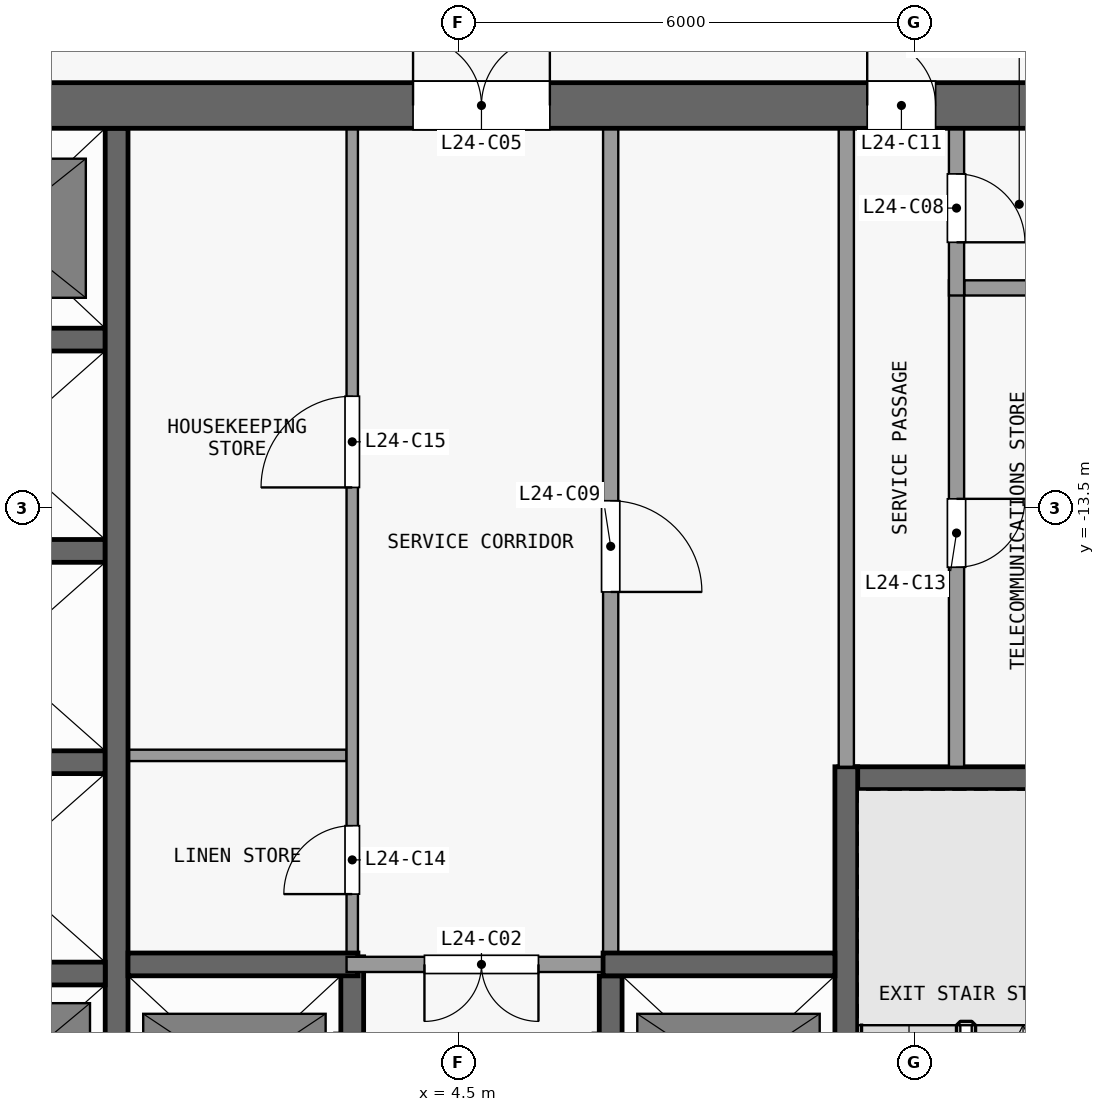
"""IFC4 building model, lengths in metres.
Left out: names, types, materials, properties, quantities, classifications, styles, units other than length and angle.
Written with IfcOpenShell. Run it as: python <this file> out.ifc"""

import sys

from ifc_helpers import new_model, si_unit, direction, frame, frame_2d, origin, place, context, subcontext, project, spatial, rectangle, extrude, element, fill, save


model = new_model("IFC4")
c1 = context("Model", 3, precision=1e-05, world=origin(), true_north=direction((0.0, 1.0)))
c2 = subcontext(c1, "Body", "Model", "MODEL_VIEW")
j1 = project(units=[si_unit("LENGTHUNIT", "METRE"), si_unit("PLANEANGLEUNIT", "RADIAN")], contexts=[c1])
p1 = place(None, origin())
s1 = spatial("IfcSite", under=j1, at=p1, CompositionType="ELEMENT")
p2 = place(p1, origin())
s2 = spatial("IfcBuilding", under=s1, at=p2, CompositionType="ELEMENT")
p3 = place(p2, frame((0.0, 0.0, 99.1)))
s3 = spatial("IfcBuildingStorey", under=s2, at=p3, CompositionType="ELEMENT", Elevation=99.1)
p4 = place(p3, frame((-13.4, -8.2, 0.0), z_axis=(0.0, 0.0, 1.0), x_axis=(1.0, 0.0, 0.0)))
e1 = element("IfcWall", 1, at=p4, inside=s3, PredefinedType="SHEAR", context=c2, shape_type="SweptSolid", body=[
    extrude(rectangle(XDim=26.8, YDim=0.6, at=frame_2d((13.4, 0.0))), origin(), (0.0, 0.0, 1.0), 3.3),
])
p5 = place(p4, frame((7.7, 0.0, 0.0)))
e2 = element("IfcOpeningElement", 2, at=p5, cuts=e1, PredefinedType="OPENING", context=c2, shape_type="SweptSolid", body=[
    extrude(rectangle(XDim=1.8, YDim=2.1, at=frame_2d((0.9, 1.05))), frame((0.0, 0.31, 0.0), z_axis=(0.0, -1.0, 0.0), x_axis=(1.0, 0.0, 0.0)), (0.0, 0.0, 1.0), 0.62),
])
p6 = place(p4, frame((17.3, 0.0, 0.0)))
e3 = element("IfcOpeningElement", 3, at=p6, cuts=e1, PredefinedType="OPENING", context=c2, shape_type="SweptSolid", body=[
    extrude(rectangle(XDim=1.8, YDim=2.1, at=frame_2d((0.9, 1.05))), frame((0.0, 0.31, 0.0), z_axis=(0.0, -1.0, 0.0), x_axis=(1.0, 0.0, 0.0)), (0.0, 0.0, 1.0), 0.62),
])
p7 = place(p4, frame((2.625, 0.0, 0.0)))
e4 = element("IfcOpeningElement", 4, at=p7, cuts=e1, PredefinedType="OPENING", context=c2, shape_type="SweptSolid", body=[
    extrude(rectangle(XDim=0.9, YDim=2.1, at=frame_2d((0.45, 1.05))), frame((0.0, 0.31, 0.0), z_axis=(0.0, -1.0, 0.0), x_axis=(1.0, 0.0, 0.0)), (0.0, 0.0, 1.0), 0.62),
])
p8 = place(p4, frame((23.275, 0.0, 0.0)))
e5 = element("IfcOpeningElement", 5, at=p8, cuts=e1, PredefinedType="OPENING", context=c2, shape_type="SweptSolid", body=[
    extrude(rectangle(XDim=0.9, YDim=2.1, at=frame_2d((0.45, 1.05))), frame((0.0, 0.31, 0.0), z_axis=(0.0, -1.0, 0.0), x_axis=(1.0, 0.0, 0.0)), (0.0, 0.0, 1.0), 0.62),
])
p9 = place(p3, frame((-2.95, -19.62, 0.0), z_axis=(0.0, 0.0, 1.0), x_axis=(1.0, 0.0, 0.0)))
e6 = element("IfcWall", 6, at=p9, inside=s3, PredefinedType="SHEAR", context=c2, shape_type="SweptSolid", body=[
    extrude(rectangle(XDim=2.8, YDim=0.3, at=frame_2d((1.4, 0.0))), origin(), (0.0, 0.0, 1.0), 3.3),
])
p10 = place(p3, frame((0.15, -19.5, 0.0), z_axis=(0.0, 0.0, 1.0), x_axis=(1.0, 0.0, 0.0)))
e7 = element("IfcWall", 7, at=p10, inside=s3, PredefinedType="SHEAR", context=c2, shape_type="SweptSolid", body=[
    extrude(rectangle(XDim=3.025, YDim=0.3, at=frame_2d((1.513, 0.0))), origin(), (0.0, 0.0, 1.0), 3.3),
])
p11 = place(p3, frame((6.4, -19.5, 0.0), z_axis=(0.0, 0.0, 1.0), x_axis=(-1.0, 0.0, 0.0)))
e8 = element("IfcWall", 8, at=p11, inside=s3, PredefinedType="PARTITIONING", context=c2, shape_type="SweptSolid", body=[
    extrude(rectangle(XDim=3.375, YDim=0.2, at=frame_2d((1.688, 0.0))), origin(), (0.0, 0.0, 1.0), 3.3),
])
p12 = place(p11, frame((0.85, 0.0, 0.0)))
e9 = element("IfcOpeningElement", 9, at=p12, cuts=e8, PredefinedType="OPENING", context=c2, shape_type="SweptSolid", body=[
    extrude(rectangle(XDim=1.5, YDim=2.1, at=frame_2d((0.75, 1.05))), frame((0.0, 0.11, 0.0), z_axis=(0.0, -1.0, 0.0), x_axis=(1.0, 0.0, 0.0)), (0.0, 0.0, 1.0), 0.22),
])
p13 = place(p3, frame((6.4, -19.5, 0.0), z_axis=(0.0, 0.0, 1.0), x_axis=(1.0, 0.0, 0.0)))
e10 = element("IfcWall", 10, at=p13, inside=s3, PredefinedType="SHEAR", context=c2, shape_type="SweptSolid", body=[
    extrude(rectangle(XDim=3.05, YDim=0.3, at=frame_2d((1.525, 0.0))), origin(), (0.0, 0.0, 1.0), 3.3),
])
p14 = place(p3, frame((9.5, -17.05, 0.0), z_axis=(0.0, 0.0, 1.0), x_axis=(1.0, 0.0, 0.0)))
e11 = element("IfcWall", 11, at=p14, inside=s3, PredefinedType="SHEAR", context=c2, shape_type="SweptSolid", body=[
    extrude(rectangle(XDim=3.1, YDim=0.3, at=frame_2d((1.55, 0.0))), origin(), (0.0, 0.0, 1.0), 3.3),
])
p15 = place(p3, frame((-2.95, -16.84, 0.0), z_axis=(0.0, 0.0, 1.0), x_axis=(1.0, 0.0, 0.0)))
e12 = element("IfcWall", 12, at=p15, inside=s3, PredefinedType="SHEAR", context=c2, shape_type="SweptSolid", body=[
    extrude(rectangle(XDim=2.8, YDim=0.3, at=frame_2d((1.4, 0.0))), origin(), (0.0, 0.0, 1.0), 3.3),
])
p16 = place(p3, frame((0.15, -16.75, 0.0), z_axis=(0.0, 0.0, 1.0), x_axis=(1.0, 0.0, 0.0)))
e13 = element("IfcWall", 13, at=p16, inside=s3, PredefinedType="PARTITIONING", context=c2, shape_type="SweptSolid", body=[
    extrude(rectangle(XDim=2.875, YDim=0.15, at=frame_2d((1.438, 0.0))), origin(), (0.0, 0.0, 1.0), 3.3),
])
for number, where, z_axis, x_axis in (
    (14, (-2.95, -14.06, 0.0), (0.0, 0.0, 1.0), (1.0, 0.0, 0.0)),
    (15, (-2.95, -11.28, 0.0), (0.0, 0.0, 1.0), (1.0, 0.0, 0.0)),
):
    element("IfcWall", number, at=place(p3, frame(where, z_axis=z_axis, x_axis=x_axis)), inside=s3, PredefinedType="SHEAR", context=c2, shape_type="SweptSolid", body=[
        extrude(rectangle(XDim=2.8, YDim=0.3, at=frame_2d((1.4, 0.0))), origin(), (0.0, 0.0, 1.0), 3.3),
    ])
p17 = place(p3, frame((11.15, -10.6, 0.0), z_axis=(0.0, 0.0, 1.0), x_axis=(1.0, 0.0, 0.0)))
e16 = element("IfcWall", 16, at=p17, inside=s3, PredefinedType="PARTITIONING", context=c2, shape_type="SweptSolid", body=[
    extrude(rectangle(XDim=1.45, YDim=0.2, at=frame_2d((0.725, 0.0))), origin(), (0.0, 0.0, 1.0), 3.3),
])
p18 = place(p3, frame((0.0, -22.25, 0.0), z_axis=(0.0, 0.0, 1.0), x_axis=(0.0, 1.0, 0.0)))
e17 = element("IfcWall", 17, at=p18, inside=s3, PredefinedType="SHEAR", context=c2, shape_type="SweptSolid", body=[
    extrude(rectangle(XDim=13.75, YDim=0.3, at=frame_2d((6.875, 0.0))), origin(), (0.0, 0.0, 1.0), 3.3),
])
p19 = place(p3, frame((3.1, -22.25, 0.0), z_axis=(0.0, 0.0, 1.0), x_axis=(0.0, 1.0, 0.0)))
e18 = element("IfcWall", 18, at=p19, inside=s3, PredefinedType="SHEAR", context=c2, shape_type="SweptSolid", body=[
    extrude(rectangle(XDim=2.85, YDim=0.3, at=frame_2d((1.425, 0.0))), origin(), (0.0, 0.0, 1.0), 3.3),
])
p20 = place(p19, frame((0.75, 0.0, 0.0)))
e19 = element("IfcOpeningElement", 19, at=p20, cuts=e18, PredefinedType="OPENING", context=c2, shape_type="SweptSolid", body=[
    extrude(rectangle(XDim=1.1, YDim=2.1, at=frame_2d((0.55, 1.05))), frame((0.0, 0.16, 0.0), z_axis=(0.0, -1.0, 0.0), x_axis=(1.0, 0.0, 0.0)), (0.0, 0.0, 1.0), 0.32),
])
p21 = place(p3, frame((3.1, -19.4, 0.0), z_axis=(0.0, 0.0, 1.0), x_axis=(0.0, 1.0, 0.0)))
e20 = element("IfcWall", 20, at=p21, inside=s3, PredefinedType="PARTITIONING", context=c2, shape_type="SweptSolid", body=[
    extrude(rectangle(XDim=10.9, YDim=0.15, at=frame_2d((5.45, 0.0))), origin(), (0.0, 0.0, 1.0), 3.3),
])
p22 = place(p21, frame((0.825, 0.0, 0.0)))
e21 = element("IfcOpeningElement", 21, at=p22, cuts=e20, PredefinedType="OPENING", context=c2, shape_type="SweptSolid", body=[
    extrude(rectangle(XDim=0.9, YDim=2.1, at=frame_2d((0.45, 1.05))), frame((0.0, 0.085, 0.0), z_axis=(0.0, -1.0, 0.0), x_axis=(1.0, 0.0, 0.0)), (0.0, 0.0, 1.0), 0.17),
])
p23 = place(p21, frame((6.175, 0.0, 0.0)))
e22 = element("IfcOpeningElement", 22, at=p23, cuts=e20, PredefinedType="OPENING", context=c2, shape_type="SweptSolid", body=[
    extrude(rectangle(XDim=1.2, YDim=2.1, at=frame_2d((0.6, 1.05))), frame((0.0, 0.085, 0.0), z_axis=(0.0, -1.0, 0.0), x_axis=(1.0, 0.0, 0.0)), (0.0, 0.0, 1.0), 0.17),
])
p24 = place(p3, frame((6.5, -22.25, 0.0), z_axis=(0.0, 0.0, 1.0), x_axis=(0.0, 1.0, 0.0)))
e23 = element("IfcWall", 23, at=p24, inside=s3, PredefinedType="SHEAR", context=c2, shape_type="SweptSolid", body=[
    extrude(rectangle(XDim=2.6, YDim=0.3, at=frame_2d((1.3, 0.0))), origin(), (0.0, 0.0, 1.0), 3.3),
])
p25 = place(p24, frame((0.75, 0.0, 0.0)))
e24 = element("IfcOpeningElement", 24, at=p25, cuts=e23, PredefinedType="OPENING", context=c2, shape_type="SweptSolid", body=[
    extrude(rectangle(XDim=1.1, YDim=2.1, at=frame_2d((0.55, 1.05))), frame((0.0, 0.16, 0.0), z_axis=(0.0, -1.0, 0.0), x_axis=(1.0, 0.0, 0.0)), (0.0, 0.0, 1.0), 0.32),
])
p26 = place(p3, frame((6.5, -8.5, 0.0), z_axis=(0.0, 0.0, 1.0), x_axis=(0.0, -1.0, 0.0)))
e25 = element("IfcWall", 25, at=p26, inside=s3, PredefinedType="PARTITIONING", context=c2, shape_type="SweptSolid", body=[
    extrude(rectangle(XDim=10.85, YDim=0.2, at=frame_2d((5.425, 0.0))), origin(), (0.0, 0.0, 1.0), 3.3),
])
p27 = place(p26, frame((4.9, 0.0, 0.0)))
e26 = element("IfcOpeningElement", 26, at=p27, cuts=e25, PredefinedType="OPENING", context=c2, shape_type="SweptSolid", body=[
    extrude(rectangle(XDim=1.2, YDim=2.1, at=frame_2d((0.6, 1.05))), frame((0.0, 0.11, 0.0), z_axis=(0.0, -1.0, 0.0), x_axis=(1.0, 0.0, 0.0)), (0.0, 0.0, 1.0), 0.22),
])
p28 = place(p3, frame((9.6, -16.9, 0.0), z_axis=(0.0, 0.0, 1.0), x_axis=(0.0, -1.0, 0.0)))
e27 = element("IfcWall", 27, at=p28, inside=s3, PredefinedType="SHEAR", context=c2, shape_type="SweptSolid", body=[
    extrude(rectangle(XDim=7.7, YDim=0.3, at=frame_2d((3.85, 0.0))), origin(), (0.0, 0.0, 1.0), 3.3),
])
p29 = place(p28, frame((6.5, 0.0, 0.0)))
e28 = element("IfcOpeningElement", 28, at=p29, cuts=e27, PredefinedType="OPENING", context=c2, shape_type="SweptSolid", body=[
    extrude(rectangle(XDim=1.1, YDim=2.1, at=frame_2d((0.55, 1.05))), frame((0.0, 0.16, 0.0), z_axis=(0.0, -1.0, 0.0), x_axis=(1.0, 0.0, 0.0)), (0.0, 0.0, 1.0), 0.32),
])
p30 = place(p3, frame((9.6, -16.9, 0.0), z_axis=(0.0, 0.0, 1.0), x_axis=(0.0, 1.0, 0.0)))
e29 = element("IfcWall", 29, at=p30, inside=s3, PredefinedType="PARTITIONING", context=c2, shape_type="SweptSolid", body=[
    extrude(rectangle(XDim=8.4, YDim=0.2, at=frame_2d((4.2, 0.0))), origin(), (0.0, 0.0, 1.0), 3.3),
])
p31 = place(p3, frame((11.05, -10.5, 0.0), z_axis=(0.0, 0.0, 1.0), x_axis=(0.0, -1.0, 0.0)))
e30 = element("IfcWall", 30, at=p31, inside=s3, PredefinedType="PARTITIONING", context=c2, shape_type="SweptSolid", body=[
    extrude(rectangle(XDim=6.4, YDim=0.2, at=frame_2d((3.2, 0.0))), origin(), (0.0, 0.0, 1.0), 3.3),
])
p32 = place(p31, frame((2.875, 0.0, 0.0)))
e31 = element("IfcOpeningElement", 31, at=p32, cuts=e30, PredefinedType="OPENING", context=c2, shape_type="SweptSolid", body=[
    extrude(rectangle(XDim=0.9, YDim=2.1, at=frame_2d((0.45, 1.05))), frame((0.0, 0.11, 0.0), z_axis=(0.0, -1.0, 0.0), x_axis=(1.0, 0.0, 0.0)), (0.0, 0.0, 1.0), 0.22),
])
p33 = place(p3, frame((11.05, -8.5, 0.0), z_axis=(0.0, 0.0, 1.0), x_axis=(0.0, -1.0, 0.0)))
e32 = element("IfcWall", 32, at=p33, inside=s3, PredefinedType="PARTITIONING", context=c2, shape_type="SweptSolid", body=[
    extrude(rectangle(XDim=2.2, YDim=0.2, at=frame_2d((1.1, 0.0))), origin(), (0.0, 0.0, 1.0), 3.3),
])
p34 = place(p33, frame((0.6, 0.0, 0.0)))
e33 = element("IfcOpeningElement", 33, at=p34, cuts=e32, PredefinedType="OPENING", context=c2, shape_type="SweptSolid", body=[
    extrude(rectangle(XDim=0.9, YDim=2.1, at=frame_2d((0.45, 1.05))), frame((0.0, 0.11, 0.0), z_axis=(0.0, -1.0, 0.0), x_axis=(1.0, 0.0, 0.0)), (0.0, 0.0, 1.0), 0.22),
])
p35 = place(p12, origin())
e34 = element("IfcDoor", 34, at=p35, inside=s3, OperationType="DOUBLE_DOOR_SINGLE_SWING", PredefinedType="DOOR", context=c2, shape_type="SweptSolid", body=[
    extrude(rectangle(XDim=1.5, YDim=2.1, at=frame_2d((0.75, 1.05))), frame((0.0, 0.025, 0.0), z_axis=(0.0, -1.0, 0.0), x_axis=(1.0, 0.0, 0.0)), (0.0, 0.0, 1.0), 0.05),
])
fill(e9, e34)
p36 = place(p6, origin())
e35 = element("IfcDoor", 35, at=p36, inside=s3, OperationType="DOUBLE_DOOR_SINGLE_SWING", PredefinedType="DOOR", context=c2, shape_type="SweptSolid", body=[
    extrude(rectangle(XDim=1.8, YDim=2.1, at=frame_2d((0.9, 1.05))), frame((0.0, 0.025, 0.0), z_axis=(0.0, -1.0, 0.0), x_axis=(1.0, 0.0, 0.0)), (0.0, 0.0, 1.0), 0.05),
])
fill(e3, e35)
p37 = place(p34, origin())
e36 = element("IfcDoor", 36, at=p37, inside=s3, OperationType="SINGLE_SWING_RIGHT", PredefinedType="DOOR", context=c2, shape_type="SweptSolid", body=[
    extrude(rectangle(XDim=0.9, YDim=2.1, at=frame_2d((0.45, 1.05))), frame((0.0, 0.025, 0.0), z_axis=(0.0, -1.0, 0.0), x_axis=(1.0, 0.0, 0.0)), (0.0, 0.0, 1.0), 0.05),
])
fill(e33, e36)
p38 = place(p27, origin())
e37 = element("IfcDoor", 37, at=p38, inside=s3, OperationType="SINGLE_SWING_RIGHT", PredefinedType="DOOR", context=c2, shape_type="SweptSolid", body=[
    extrude(rectangle(XDim=1.2, YDim=2.1, at=frame_2d((0.6, 1.05))), frame((0.0, 0.025, 0.0), z_axis=(0.0, -1.0, 0.0), x_axis=(1.0, 0.0, 0.0)), (0.0, 0.0, 1.0), 0.05),
])
fill(e26, e37)
p39 = place(p8, origin())
e38 = element("IfcDoor", 38, at=p39, inside=s3, OperationType="SINGLE_SWING_LEFT", PredefinedType="DOOR", context=c2, shape_type="SweptSolid", body=[
    extrude(rectangle(XDim=0.9, YDim=2.1, at=frame_2d((0.45, 1.05))), frame((0.0, 0.025, 0.0), z_axis=(0.0, -1.0, 0.0), x_axis=(1.0, 0.0, 0.0)), (0.0, 0.0, 1.0), 0.05),
])
fill(e5, e38)
p40 = place(p32, origin())
e39 = element("IfcDoor", 39, at=p40, inside=s3, OperationType="SINGLE_SWING_LEFT", PredefinedType="DOOR", context=c2, shape_type="SweptSolid", body=[
    extrude(rectangle(XDim=0.9, YDim=2.1, at=frame_2d((0.45, 1.05))), frame((0.0, 0.025, 0.0), z_axis=(0.0, -1.0, 0.0), x_axis=(1.0, 0.0, 0.0)), (0.0, 0.0, 1.0), 0.05),
])
fill(e31, e39)
p41 = place(p22, origin())
e40 = element("IfcDoor", 40, at=p41, inside=s3, OperationType="SINGLE_SWING_LEFT", PredefinedType="DOOR", context=c2, shape_type="SweptSolid", body=[
    extrude(rectangle(XDim=0.9, YDim=2.1, at=frame_2d((0.45, 1.05))), frame((0.0, 0.025, 0.0), z_axis=(0.0, -1.0, 0.0), x_axis=(1.0, 0.0, 0.0)), (0.0, 0.0, 1.0), 0.05),
])
fill(e21, e40)
p42 = place(p23, origin())
e41 = element("IfcDoor", 41, at=p42, inside=s3, OperationType="SINGLE_SWING_LEFT", PredefinedType="DOOR", context=c2, shape_type="SweptSolid", body=[
    extrude(rectangle(XDim=1.2, YDim=2.1, at=frame_2d((0.6, 1.05))), frame((0.0, 0.025, 0.0), z_axis=(0.0, -1.0, 0.0), x_axis=(1.0, 0.0, 0.0)), (0.0, 0.0, 1.0), 0.05),
])
fill(e22, e41)
save(model, sys.argv[1])
